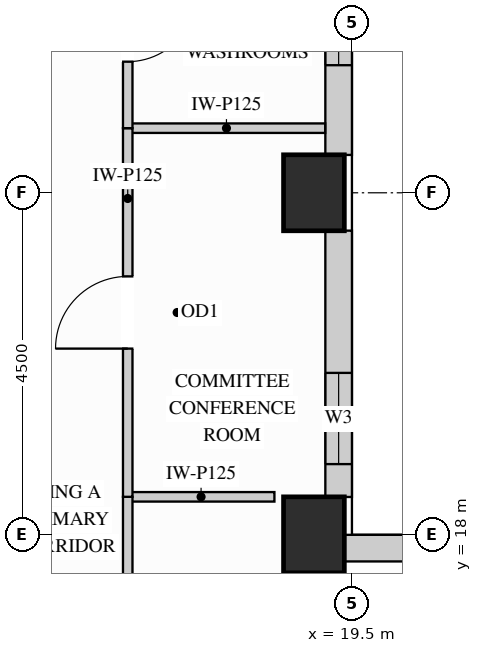
"""IFC4 building model, lengths in metres.
Left out: names, types, materials, properties, quantities, classifications, styles, units other than length and angle.
Written with IfcOpenShell. Run it as: python <this file> out.ifc"""

import sys

from ifc_helpers import new_model, si_unit, direction, frame, frame_2d, origin, origin_2d, place, context, subcontext, project, spatial, rectangle, extrude, source, transform, mapped, element, fill, save


model = new_model("IFC4")
c1 = context("Model", 3, precision=1e-05, world=origin(), true_north=direction((0.0, 1.0)))
c2 = subcontext(c1, "Body", "Model", "MODEL_VIEW")
j1 = project(units=[si_unit("LENGTHUNIT", "METRE"), si_unit("PLANEANGLEUNIT", "RADIAN")], contexts=[c1])
p1 = place(None, origin())
s1 = spatial("IfcSite", under=j1, at=p1, CompositionType="ELEMENT")
p2 = place(p1, origin())
s2 = spatial("IfcBuilding", under=s1, at=p2, CompositionType="ELEMENT")
p3 = place(p2, frame((0.0, 0.0, 179.1)))
s3 = spatial("IfcBuildingStorey", under=s2, at=p3, CompositionType="ELEMENT", Elevation=179.1)
m1 = source(origin(), c2, "Body", "SweptSolid", [
    extrude(rectangle(XDim=0.8, YDim=1.0, at=origin_2d()), origin(), (0.0, 0.0, 1.0), 3.4),
])
for number, where, z_axis, x_axis in (
    (1, (19.0, 18.0, 0.0), (0.0, 0.0, 1.0), (1.0, 0.0, 0.0)),
    (2, (19.0, 22.5, 0.0), (0.0, 0.0, 1.0), (1.0, 0.0, 0.0)),
):
    element("IfcColumn", number, at=place(p3, frame(where, z_axis=z_axis, x_axis=x_axis)), inside=s3, PredefinedType="COLUMN", context=c2, shape_type="MappedRepresentation", body=[
        mapped(m1, transform((0.0, 0.0, 0.0), x_axis=(1.0, 0.0, 0.0), y_axis=(0.0, 1.0, 0.0), z_axis=(0.0, 0.0, 1.0))),
    ])
p4 = place(p3, frame((34.502, 17.825, 0.0), z_axis=(0.0, 0.0, 1.0), x_axis=(-1.0, 0.0, 0.0)))
e3 = element("IfcWall", 3, at=p4, inside=s3, PredefinedType="SOLIDWALL", context=c2, shape_type="SweptSolid", body=[
    extrude(rectangle(XDim=15.104, YDim=0.35, at=frame_2d((7.552, 0.0))), origin(), (0.0, 0.0, 1.0), 3.385),
])
p5 = place(p4, frame((4.131, 0.0, 0.78)))
e4 = element("IfcOpeningElement", 4, at=p5, cuts=e3, PredefinedType="OPENING", context=c2, shape_type="SweptSolid", body=[
    extrude(rectangle(XDim=1.5, YDim=2.0, at=frame_2d((0.75, 1.0))), frame((0.0, 0.185, 0.0), z_axis=(0.0, -1.0, 0.0), x_axis=(1.0, 0.0, 0.0)), (0.0, 0.0, 1.0), 0.37),
])
p6 = place(p4, frame((9.442, 0.0, 0.78)))
e5 = element("IfcOpeningElement", 5, at=p6, cuts=e3, PredefinedType="OPENING", context=c2, shape_type="SweptSolid", body=[
    extrude(rectangle(XDim=1.5, YDim=2.0, at=frame_2d((0.75, 1.0))), frame((0.0, 0.185, 0.0), z_axis=(0.0, -1.0, 0.0), x_axis=(1.0, 0.0, 0.0)), (0.0, 0.0, 1.0), 0.37),
])
p7 = place(p3, frame((19.325, 18.498, 0.0), z_axis=(0.0, 0.0, 1.0), x_axis=(0.0, 1.0, 0.0)))
e6 = element("IfcWall", 6, at=p7, inside=s3, PredefinedType="SOLIDWALL", context=c2, shape_type="SweptSolid", body=[
    extrude(rectangle(XDim=3.504, YDim=0.35, at=frame_2d((1.752, 0.0))), origin(), (0.0, 0.0, 1.0), 2.612),
])
p8 = place(p7, frame((0.433, 0.0, 0.78)))
e7 = element("IfcOpeningElement", 7, at=p8, cuts=e6, PredefinedType="OPENING", context=c2, shape_type="SweptSolid", body=[
    extrude(rectangle(XDim=1.2, YDim=1.652, at=frame_2d((0.6, 0.826))), frame((0.0, 0.185, 0.0), z_axis=(0.0, -1.0, 0.0), x_axis=(1.0, 0.0, 0.0)), (0.0, 0.0, 1.0), 0.37),
])
p9 = place(p3, frame((19.325, 22.998, 0.0), z_axis=(0.0, 0.0, 1.0), x_axis=(0.0, 1.0, 0.0)))
e8 = element("IfcWall", 8, at=p9, inside=s3, PredefinedType="SOLIDWALL", context=c2, shape_type="SweptSolid", body=[
    extrude(rectangle(XDim=3.304, YDim=0.35, at=frame_2d((1.652, 0.0))), origin(), (0.0, 0.0, 1.0), 2.612),
])
p10 = place(p9, frame((1.18, 0.0, 0.78)))
e9 = element("IfcOpeningElement", 9, at=p10, cuts=e8, PredefinedType="OPENING", context=c2, shape_type="SweptSolid", body=[
    extrude(rectangle(XDim=1.5, YDim=1.652, at=frame_2d((0.75, 0.826))), frame((0.0, 0.185, 0.0), z_axis=(0.0, -1.0, 0.0), x_axis=(1.0, 0.0, 0.0)), (0.0, 0.0, 1.0), 0.37),
])
m2 = source(origin(), c2, "Body", "SweptSolid", [
    extrude(rectangle(XDim=1.93, YDim=0.125, at=frame_2d((0.965, 0.0))), origin(), (0.0, 0.0, 1.0), 3.385),
])
p11 = place(p3, frame((16.55, 18.5, 0.0), z_axis=(0.0, 0.0, 1.0), x_axis=(1.0, 0.0, 0.0)))
e10 = element("IfcWall", 10, at=p11, inside=s3, PredefinedType="PARTITIONING", context=c2, shape_type="MappedRepresentation", body=[
    mapped(m2, transform((0.0, 0.0, 0.0), x_axis=(1.0, 0.0, 0.0), y_axis=(0.0, 1.0, 0.0), z_axis=(0.0, 0.0, 1.0))),
])
m3 = source(origin(), c2, "Body", "SweptSolid", [
    extrude(rectangle(XDim=2.598, YDim=0.125, at=frame_2d((1.299, 0.0))), origin(), (0.0, 0.0, 1.0), 3.385),
])
p12 = place(p3, frame((16.55, 23.35, 0.0), z_axis=(0.0, 0.0, 1.0), x_axis=(1.0, 0.0, 0.0)))
e11 = element("IfcWall", 11, at=p12, inside=s3, PredefinedType="PARTITIONING", context=c2, shape_type="MappedRepresentation", body=[
    mapped(m3, transform((0.0, 0.0, 0.0), x_axis=(1.0, 0.0, 0.0), y_axis=(0.0, 1.0, 0.0), z_axis=(0.0, 0.0, 1.0))),
])
p13 = place(p3, frame((16.55, 12.35, 0.0), z_axis=(0.0, 0.0, 1.0), x_axis=(0.0, 1.0, 0.0)))
e12 = element("IfcWall", 12, at=p13, inside=s3, PredefinedType="PARTITIONING", context=c2, shape_type="SweptSolid", body=[
    extrude(rectangle(XDim=6.15, YDim=0.125, at=frame_2d((3.075, 0.0))), origin(), (0.0, 0.0, 1.0), 3.385),
])
p14 = place(p13, frame((2.6, 0.0, 0.0)))
e13 = element("IfcOpeningElement", 13, at=p14, cuts=e12, PredefinedType="OPENING", context=c2, shape_type="SweptSolid", body=[
    extrude(rectangle(XDim=0.95, YDim=2.15, at=frame_2d((0.475, 1.075))), frame((0.0, 0.073, 0.0), z_axis=(0.0, -1.0, 0.0), x_axis=(1.0, 0.0, 0.0)), (0.0, 0.0, 1.0), 0.145),
])
p15 = place(p3, frame((16.55, 18.5, 0.0), z_axis=(0.0, 0.0, 1.0), x_axis=(0.0, 1.0, 0.0)))
e14 = element("IfcWall", 14, at=p15, inside=s3, PredefinedType="PARTITIONING", context=c2, shape_type="SweptSolid", body=[
    extrude(rectangle(XDim=4.85, YDim=0.125, at=frame_2d((2.425, 0.0))), origin(), (0.0, 0.0, 1.0), 3.385),
])
p16 = place(p15, frame((1.95, 0.0, 0.0)))
e15 = element("IfcOpeningElement", 15, at=p16, cuts=e14, PredefinedType="OPENING", context=c2, shape_type="SweptSolid", body=[
    extrude(rectangle(XDim=0.95, YDim=2.15, at=frame_2d((0.475, 1.075))), frame((0.0, 0.073, 0.0), z_axis=(0.0, -1.0, 0.0), x_axis=(1.0, 0.0, 0.0)), (0.0, 0.0, 1.0), 0.145),
])
p17 = place(p3, frame((16.55, 23.35, 0.0), z_axis=(0.0, 0.0, 1.0), x_axis=(0.0, 1.0, 0.0)))
e16 = element("IfcWall", 16, at=p17, inside=s3, PredefinedType="PARTITIONING", context=c2, shape_type="SweptSolid", body=[
    extrude(rectangle(XDim=2.7, YDim=0.125, at=frame_2d((1.35, 0.0))), origin(), (0.0, 0.0, 1.0), 3.385),
])
p18 = place(p17, frame((0.875, 0.0, 0.0)))
e17 = element("IfcOpeningElement", 17, at=p18, cuts=e16, PredefinedType="OPENING", context=c2, shape_type="SweptSolid", body=[
    extrude(rectangle(XDim=0.9, YDim=2.15, at=frame_2d((0.45, 1.075))), frame((0.0, 0.073, 0.0), z_axis=(0.0, -1.0, 0.0), x_axis=(1.0, 0.0, 0.0)), (0.0, 0.0, 1.0), 0.145),
])
m4 = source(origin(), c2, "Body", "SweptSolid", [
    extrude(rectangle(XDim=0.95, YDim=2.15, at=frame_2d((0.475, 1.075))), frame((0.0, 0.025, 0.0), z_axis=(0.0, -1.0, 0.0), x_axis=(1.0, 0.0, 0.0)), (0.0, 0.0, 1.0), 0.05),
])
p19 = place(p16, origin())
e18 = element("IfcDoor", 18, at=p19, inside=s3, OperationType="SINGLE_SWING_LEFT", PredefinedType="DOOR", context=c2, shape_type="MappedRepresentation", body=[
    mapped(m4, transform((0.0, 0.0, 0.0), x_axis=(1.0, 0.0, 0.0), y_axis=(0.0, 1.0, 0.0), z_axis=(0.0, 0.0, 1.0))),
])
fill(e15, e18)
m5 = source(origin(), c2, "Body", "SweptSolid", [
    extrude(rectangle(XDim=0.9, YDim=2.15, at=frame_2d((0.45, 1.075))), frame((0.0, 0.025, 0.0), z_axis=(0.0, -1.0, 0.0), x_axis=(1.0, 0.0, 0.0)), (0.0, 0.0, 1.0), 0.05),
])
p20 = place(p18, origin())
e19 = element("IfcDoor", 19, at=p20, inside=s3, OperationType="SINGLE_SWING_RIGHT", PredefinedType="DOOR", context=c2, shape_type="MappedRepresentation", body=[
    mapped(m5, transform((0.0, 0.0, 0.0), x_axis=(1.0, 0.0, 0.0), y_axis=(0.0, 1.0, 0.0), z_axis=(0.0, 0.0, 1.0))),
])
fill(e17, e19)
m6 = source(origin(), c2, "Body", "SweptSolid", [
    extrude(rectangle(XDim=1.2, YDim=1.652, at=frame_2d((0.6, 0.826))), frame((0.0, 0.03, 0.0), z_axis=(0.0, -1.0, 0.0), x_axis=(1.0, 0.0, 0.0)), (0.0, 0.0, 1.0), 0.06),
])
p21 = place(p8, origin())
e20 = element("IfcWindow", 20, at=p21, inside=s3, PartitioningType="SINGLE_PANEL", PredefinedType="WINDOW", context=c2, shape_type="MappedRepresentation", body=[
    mapped(m6, transform((0.0, 0.0, 0.0), x_axis=(1.0, 0.0, 0.0), y_axis=(0.0, 1.0, 0.0), z_axis=(0.0, 0.0, 1.0))),
])
fill(e7, e20)
m7 = source(origin(), c2, "Body", "SweptSolid", [
    extrude(rectangle(XDim=1.5, YDim=1.652, at=frame_2d((0.75, 0.826))), frame((0.0, 0.03, 0.0), z_axis=(0.0, -1.0, 0.0), x_axis=(1.0, 0.0, 0.0)), (0.0, 0.0, 1.0), 0.06),
])
p22 = place(p10, origin())
e21 = element("IfcWindow", 21, at=p22, inside=s3, PartitioningType="SINGLE_PANEL", PredefinedType="WINDOW", context=c2, shape_type="MappedRepresentation", body=[
    mapped(m7, transform((0.0, 0.0, 0.0), x_axis=(1.0, 0.0, 0.0), y_axis=(0.0, 1.0, 0.0), z_axis=(0.0, 0.0, 1.0))),
])
fill(e9, e21)
save(model, sys.argv[1])
